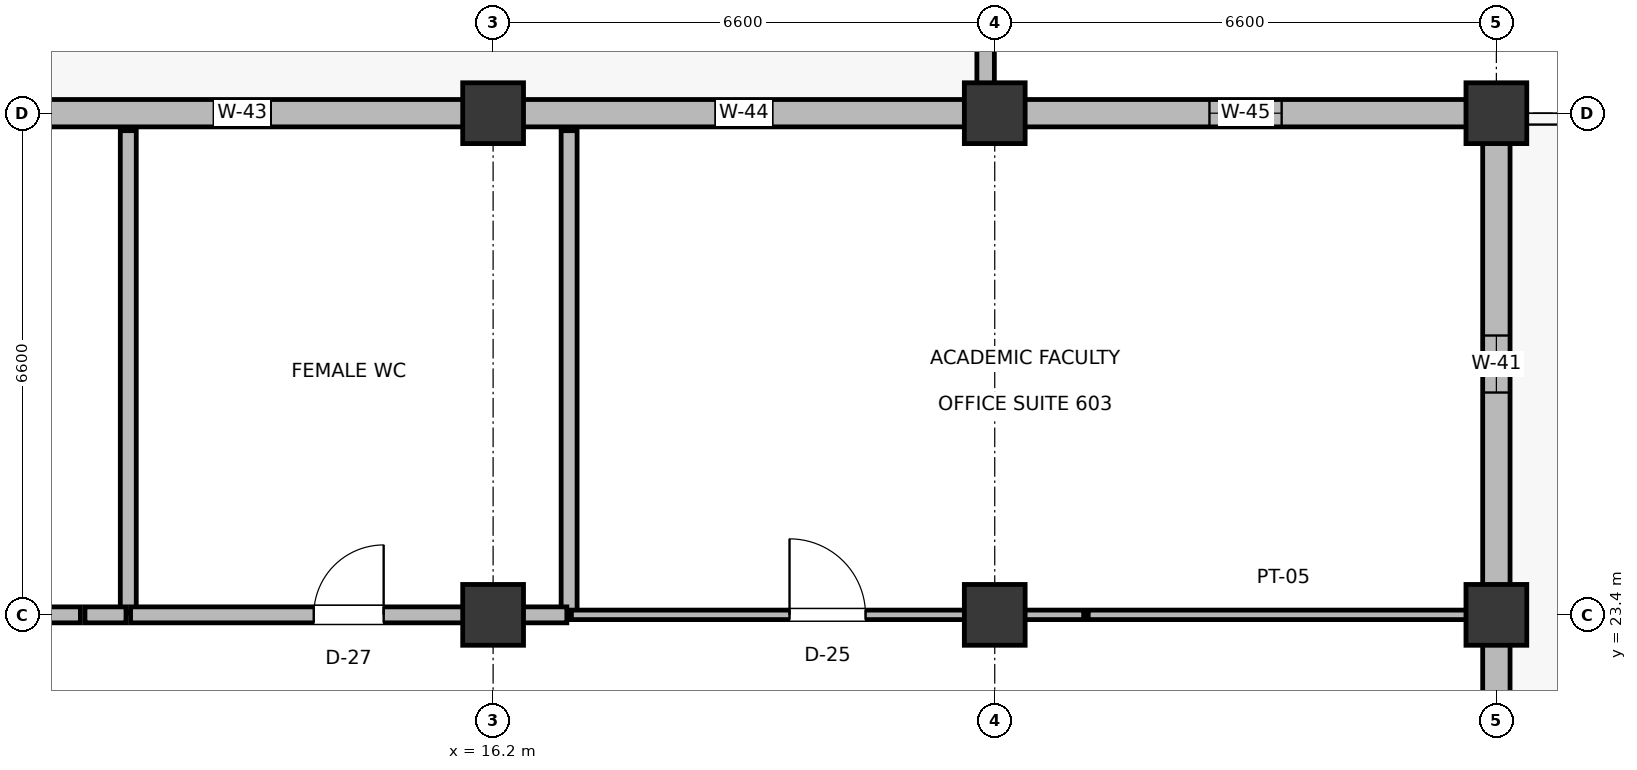
"""IFC4 building model, lengths in metres.
Left out: names, types, materials, properties, quantities, classifications, styles, units other than length and angle.
Written with IfcOpenShell. Run it as: python <this file> out.ifc"""

import sys

from ifc_helpers import new_model, si_unit, direction, frame, frame_2d, origin, origin_2d, place, context, subcontext, project, spatial, rectangle, extrude, element, fill, save


model = new_model("IFC4")
c1 = context("Model", 3, precision=1e-05, world=origin(), true_north=direction((0.0, 1.0)))
c2 = subcontext(c1, "Body", "Model", "MODEL_VIEW")
j1 = project(units=[si_unit("LENGTHUNIT", "METRE"), si_unit("PLANEANGLEUNIT", "RADIAN")], contexts=[c1])
p1 = place(None, origin())
s1 = spatial("IfcSite", under=j1, at=p1, CompositionType="ELEMENT")
p2 = place(p1, origin())
s2 = spatial("IfcBuilding", under=s1, at=p2, CompositionType="ELEMENT")
p3 = place(p2, frame((0.0, 0.0, 28.5)))
s3 = spatial("IfcBuildingStorey", under=s2, at=p3, CompositionType="ELEMENT", Elevation=28.5)
for number, where, z_axis, x_axis in (
    (1, (16.2, 23.4, 0.0), (0.0, 0.0, 1.0), (1.0, 0.0, 0.0)),
    (2, (16.2, 30.0, 0.0), (0.0, 0.0, 1.0), (1.0, 0.0, 0.0)),
    (3, (22.8, 23.4, 0.0), (0.0, 0.0, 1.0), (1.0, 0.0, 0.0)),
    (4, (22.8, 30.0, 0.0), (0.0, 0.0, 1.0), (1.0, 0.0, 0.0)),
    (5, (29.4, 23.4, 0.0), (0.0, 0.0, 1.0), (1.0, 0.0, 0.0)),
    (6, (29.4, 30.0, 0.0), (0.0, 0.0, 1.0), (1.0, 0.0, 0.0)),
):
    element("IfcColumn", number, at=place(p3, frame(where, z_axis=z_axis, x_axis=x_axis)), inside=s3, PredefinedType="COLUMN", context=c2, shape_type="SweptSolid", body=[
        extrude(rectangle(XDim=0.8, YDim=0.8, at=origin_2d()), origin(), (0.0, 0.0, 1.0), 4.5),
    ])
p4 = place(p3, frame((29.4, 9.385, 0.0), z_axis=(0.0, 0.0, 1.0), x_axis=(0.0, 1.0, 0.0)))
e7 = element("IfcWall", 7, at=p4, inside=s3, PredefinedType="SOLIDWALL", context=c2, shape_type="SweptSolid", body=[
    extrude(rectangle(XDim=13.63, YDim=0.36, at=frame_2d((6.815, 0.0))), origin(), (0.0, 0.0, 1.0), 3.425),
])
p5 = place(p4, frame((6.24, 0.0, 0.0)))
e8 = element("IfcOpeningElement", 8, at=p5, cuts=e7, PredefinedType="OPENING", context=c2, shape_type="SweptSolid", body=[
    extrude(rectangle(XDim=1.15, YDim=2.2, at=frame_2d((0.575, 1.1))), frame((0.0, 0.19, 0.0), z_axis=(0.0, -1.0, 0.0), x_axis=(1.0, 0.0, 0.0)), (0.0, 0.0, 1.0), 0.38),
])
p6 = place(p3, frame((29.4, 23.785, 0.0), z_axis=(0.0, 0.0, 1.0), x_axis=(0.0, 1.0, 0.0)))
e9 = element("IfcWall", 9, at=p6, inside=s3, PredefinedType="SOLIDWALL", context=c2, shape_type="SweptSolid", body=[
    extrude(rectangle(XDim=5.83, YDim=0.36, at=frame_2d((2.915, 0.0))), origin(), (0.0, 0.0, 1.0), 3.625),
])
p7 = place(p6, frame((2.54, 0.0, 0.9)))
e10 = element("IfcOpeningElement", 10, at=p7, cuts=e9, PredefinedType="OPENING", context=c2, shape_type="SweptSolid", body=[
    extrude(rectangle(XDim=0.75, YDim=1.15, at=frame_2d((0.375, 0.575))), frame((0.0, 0.19, 0.0), z_axis=(0.0, -1.0, 0.0), x_axis=(1.0, 0.0, 0.0)), (0.0, 0.0, 1.0), 0.38),
])
p8 = place(p3, frame((9.985, 30.0, 0.0), z_axis=(0.0, 0.0, 1.0), x_axis=(1.0, 0.0, 0.0)))
e11 = element("IfcWall", 11, at=p8, inside=s3, PredefinedType="SOLIDWALL", context=c2, shape_type="SweptSolid", body=[
    extrude(rectangle(XDim=5.83, YDim=0.36, at=frame_2d((2.915, 0.0))), origin(), (0.0, 0.0, 1.0), 3.525),
])
p9 = place(p8, frame((2.54, 0.0, 0.9)))
e12 = element("IfcOpeningElement", 12, at=p9, cuts=e11, PredefinedType="OPENING", context=c2, shape_type="SweptSolid", body=[
    extrude(rectangle(XDim=0.75, YDim=1.55, at=frame_2d((0.375, 0.775))), frame((0.0, 0.19, 0.0), z_axis=(0.0, -1.0, 0.0), x_axis=(1.0, 0.0, 0.0)), (0.0, 0.0, 1.0), 0.38),
])
p10 = place(p3, frame((16.585, 30.0, 0.0), z_axis=(0.0, 0.0, 1.0), x_axis=(1.0, 0.0, 0.0)))
e13 = element("IfcWall", 13, at=p10, inside=s3, PredefinedType="SOLIDWALL", context=c2, shape_type="SweptSolid", body=[
    extrude(rectangle(XDim=5.83, YDim=0.36, at=frame_2d((2.915, 0.0))), origin(), (0.0, 0.0, 1.0), 3.255),
])
p11 = place(p10, frame((2.54, 0.0, 0.9)))
e14 = element("IfcOpeningElement", 14, at=p11, cuts=e13, PredefinedType="OPENING", context=c2, shape_type="SweptSolid", body=[
    extrude(rectangle(XDim=0.75, YDim=1.75, at=frame_2d((0.375, 0.875))), frame((0.0, 0.19, 0.0), z_axis=(0.0, -1.0, 0.0), x_axis=(1.0, 0.0, 0.0)), (0.0, 0.0, 1.0), 0.38),
])
p12 = place(p3, frame((23.185, 30.0, 0.0), z_axis=(0.0, 0.0, 1.0), x_axis=(1.0, 0.0, 0.0)))
e15 = element("IfcWall", 15, at=p12, inside=s3, PredefinedType="SOLIDWALL", context=c2, shape_type="SweptSolid", body=[
    extrude(rectangle(XDim=5.83, YDim=0.36, at=frame_2d((2.915, 0.0))), origin(), (0.0, 0.0, 1.0), 3.525),
])
p13 = place(p12, frame((2.44, 0.0, 0.9)))
e16 = element("IfcOpeningElement", 16, at=p13, cuts=e15, PredefinedType="OPENING", context=c2, shape_type="SweptSolid", body=[
    extrude(rectangle(XDim=0.95, YDim=1.15, at=frame_2d((0.475, 0.575))), frame((0.0, 0.19, 0.0), z_axis=(0.0, -1.0, 0.0), x_axis=(1.0, 0.0, 0.0)), (0.0, 0.0, 1.0), 0.38),
])
p14 = place(p3, frame((22.68, 30.35, 0.0), z_axis=(0.0, 0.0, 1.0), x_axis=(0.0, 1.0, 0.0)))
e17 = element("IfcWall", 17, at=p14, inside=s3, PredefinedType="PARAPET", context=c2, shape_type="SweptSolid", body=[
    extrude(rectangle(XDim=14.9, YDim=0.23, at=frame_2d((7.45, 0.0))), origin(), (0.0, 0.0, 1.0), 1.05),
])
p15 = place(p3, frame((11.4, 23.43, 0.0), z_axis=(0.0, 0.0, 1.0), x_axis=(0.0, 1.0, 0.0)))
e18 = element("IfcWall", 18, at=p15, inside=s3, PredefinedType="PLUMBINGWALL", context=c2, shape_type="SweptSolid", body=[
    extrude(rectangle(XDim=6.34, YDim=0.21, at=frame_2d((3.17, 0.0))), origin(), (0.0, 0.0, 1.0), 3.525),
])
p16 = place(p3, frame((6.63, 23.4, 0.0), z_axis=(0.0, 0.0, 1.0), x_axis=(1.0, 0.0, 0.0)))
e19 = element("IfcWall", 19, at=p16, inside=s3, PredefinedType="PLUMBINGWALL", context=c2, shape_type="SweptSolid", body=[
    extrude(rectangle(XDim=4.14, YDim=0.21, at=frame_2d((2.07, 0.0))), origin(), (0.0, 0.0, 1.0), 3.315),
])
p17 = place(p16, frame((1.43, 0.0, 0.0)))
e20 = element("IfcOpeningElement", 20, at=p17, cuts=e19, PredefinedType="OPENING", context=c2, shape_type="SweptSolid", body=[
    extrude(rectangle(XDim=0.92, YDim=2.1, at=frame_2d((0.46, 1.05))), frame((0.0, 0.115, 0.0), z_axis=(0.0, -1.0, 0.0), x_axis=(1.0, 0.0, 0.0)), (0.0, 0.0, 1.0), 0.23),
])
p18 = place(p3, frame((10.83, 23.4, 0.0), z_axis=(0.0, 0.0, 1.0), x_axis=(1.0, 0.0, 0.0)))
e21 = element("IfcWall", 21, at=p18, inside=s3, PredefinedType="PLUMBINGWALL", context=c2, shape_type="SweptSolid", body=[
    extrude(rectangle(XDim=0.54, YDim=0.21, at=frame_2d((0.27, 0.0))), origin(), (0.0, 0.0, 1.0), 3.525),
])
p19 = place(p3, frame((17.2, 23.43, 0.0), z_axis=(0.0, 0.0, 1.0), x_axis=(0.0, 1.0, 0.0)))
e22 = element("IfcWall", 22, at=p19, inside=s3, PredefinedType="PLUMBINGWALL", context=c2, shape_type="SweptSolid", body=[
    extrude(rectangle(XDim=6.34, YDim=0.21, at=frame_2d((3.17, 0.0))), origin(), (0.0, 0.0, 1.0), 3.255),
])
p20 = place(p3, frame((11.43, 23.4, 0.0), z_axis=(0.0, 0.0, 1.0), x_axis=(1.0, 0.0, 0.0)))
e23 = element("IfcWall", 23, at=p20, inside=s3, PredefinedType="PLUMBINGWALL", context=c2, shape_type="SweptSolid", body=[
    extrude(rectangle(XDim=5.74, YDim=0.21, at=frame_2d((2.87, 0.0))), origin(), (0.0, 0.0, 1.0), 3.295),
])
p21 = place(p20, frame((2.41, 0.0, 0.0)))
e24 = element("IfcOpeningElement", 24, at=p21, cuts=e23, PredefinedType="OPENING", context=c2, shape_type="SweptSolid", body=[
    extrude(rectangle(XDim=0.92, YDim=2.1, at=frame_2d((0.46, 1.05))), frame((0.0, 0.115, 0.0), z_axis=(0.0, -1.0, 0.0), x_axis=(1.0, 0.0, 0.0)), (0.0, 0.0, 1.0), 0.23),
])
p22 = place(p3, frame((24.03, 23.4, 0.0), z_axis=(0.0, 0.0, 1.0), x_axis=(1.0, 0.0, 0.0)))
e25 = element("IfcWall", 25, at=p22, inside=s3, PredefinedType="PARTITIONING", context=c2, shape_type="SweptSolid", body=[
    extrude(rectangle(XDim=5.14, YDim=0.125, at=frame_2d((2.57, 0.0))), origin(), (0.0, 0.0, 1.0), 3.525),
])
p23 = place(p3, frame((17.23, 23.4, 0.0), z_axis=(0.0, 0.0, 1.0), x_axis=(1.0, 0.0, 0.0)))
e26 = element("IfcWall", 26, at=p23, inside=s3, PredefinedType="PARTITIONING", context=c2, shape_type="SweptSolid", body=[
    extrude(rectangle(XDim=6.74, YDim=0.125, at=frame_2d((3.37, 0.0))), origin(), (0.0, 0.0, 1.0), 3.295),
])
p24 = place(p23, frame((2.87, 0.0, 0.0)))
e27 = element("IfcOpeningElement", 27, at=p24, cuts=e26, PredefinedType="OPENING", context=c2, shape_type="SweptSolid", body=[
    extrude(rectangle(XDim=1.0, YDim=2.15, at=frame_2d((0.5, 1.075))), frame((0.0, 0.073, 0.0), z_axis=(0.0, -1.0, 0.0), x_axis=(1.0, 0.0, 0.0)), (0.0, 0.0, 1.0), 0.145),
])
p25 = place(p7, frame((0.75, 0.0, 0.0), z_axis=(0.0, 0.0, 1.0), x_axis=(-1.0, 0.0, 0.0)))
e28 = element("IfcWindow", 28, at=p25, inside=s3, PartitioningType="DOUBLE_PANEL_VERTICAL", PredefinedType="WINDOW", context=c2, shape_type="SweptSolid", body=[
    extrude(rectangle(XDim=0.75, YDim=1.15, at=frame_2d((0.375, 0.575))), frame((0.0, 0.03, 0.0), z_axis=(0.0, -1.0, 0.0), x_axis=(1.0, 0.0, 0.0)), (0.0, 0.0, 1.0), 0.06),
])
fill(e10, e28)
p26 = place(p9, origin())
e29 = element("IfcWindow", 29, at=p26, inside=s3, PartitioningType="DOUBLE_PANEL_VERTICAL", PredefinedType="WINDOW", context=c2, shape_type="SweptSolid", body=[
    extrude(rectangle(XDim=0.75, YDim=1.55, at=frame_2d((0.375, 0.775))), frame((0.0, 0.03, 0.0), z_axis=(0.0, -1.0, 0.0), x_axis=(1.0, 0.0, 0.0)), (0.0, 0.0, 1.0), 0.06),
])
fill(e12, e29)
p27 = place(p11, origin())
e30 = element("IfcWindow", 30, at=p27, inside=s3, PartitioningType="DOUBLE_PANEL_VERTICAL", PredefinedType="WINDOW", context=c2, shape_type="SweptSolid", body=[
    extrude(rectangle(XDim=0.75, YDim=1.75, at=frame_2d((0.375, 0.875))), frame((0.0, 0.03, 0.0), z_axis=(0.0, -1.0, 0.0), x_axis=(1.0, 0.0, 0.0)), (0.0, 0.0, 1.0), 0.06),
])
fill(e14, e30)
p28 = place(p13, origin())
e31 = element("IfcWindow", 31, at=p28, inside=s3, PartitioningType="DOUBLE_PANEL_VERTICAL", PredefinedType="WINDOW", context=c2, shape_type="SweptSolid", body=[
    extrude(rectangle(XDim=0.95, YDim=1.15, at=frame_2d((0.475, 0.575))), frame((0.0, 0.03, 0.0), z_axis=(0.0, -1.0, 0.0), x_axis=(1.0, 0.0, 0.0)), (0.0, 0.0, 1.0), 0.06),
])
fill(e16, e31)
p29 = place(p21, origin())
e32 = element("IfcDoor", 32, at=p29, inside=s3, OperationType="SINGLE_SWING_RIGHT", PredefinedType="DOOR", context=c2, shape_type="SweptSolid", body=[
    extrude(rectangle(XDim=0.92, YDim=2.1, at=frame_2d((0.46, 1.05))), frame((0.0, 0.025, 0.0), z_axis=(0.0, -1.0, 0.0), x_axis=(1.0, 0.0, 0.0)), (0.0, 0.0, 1.0), 0.05),
])
fill(e24, e32)
p30 = place(p24, origin())
e33 = element("IfcDoor", 33, at=p30, inside=s3, OperationType="SINGLE_SWING_LEFT", PredefinedType="DOOR", context=c2, shape_type="SweptSolid", body=[
    extrude(rectangle(XDim=1.0, YDim=2.15, at=frame_2d((0.5, 1.075))), frame((0.0, 0.025, 0.0), z_axis=(0.0, -1.0, 0.0), x_axis=(1.0, 0.0, 0.0)), (0.0, 0.0, 1.0), 0.05),
])
fill(e27, e33)
save(model, sys.argv[1])
